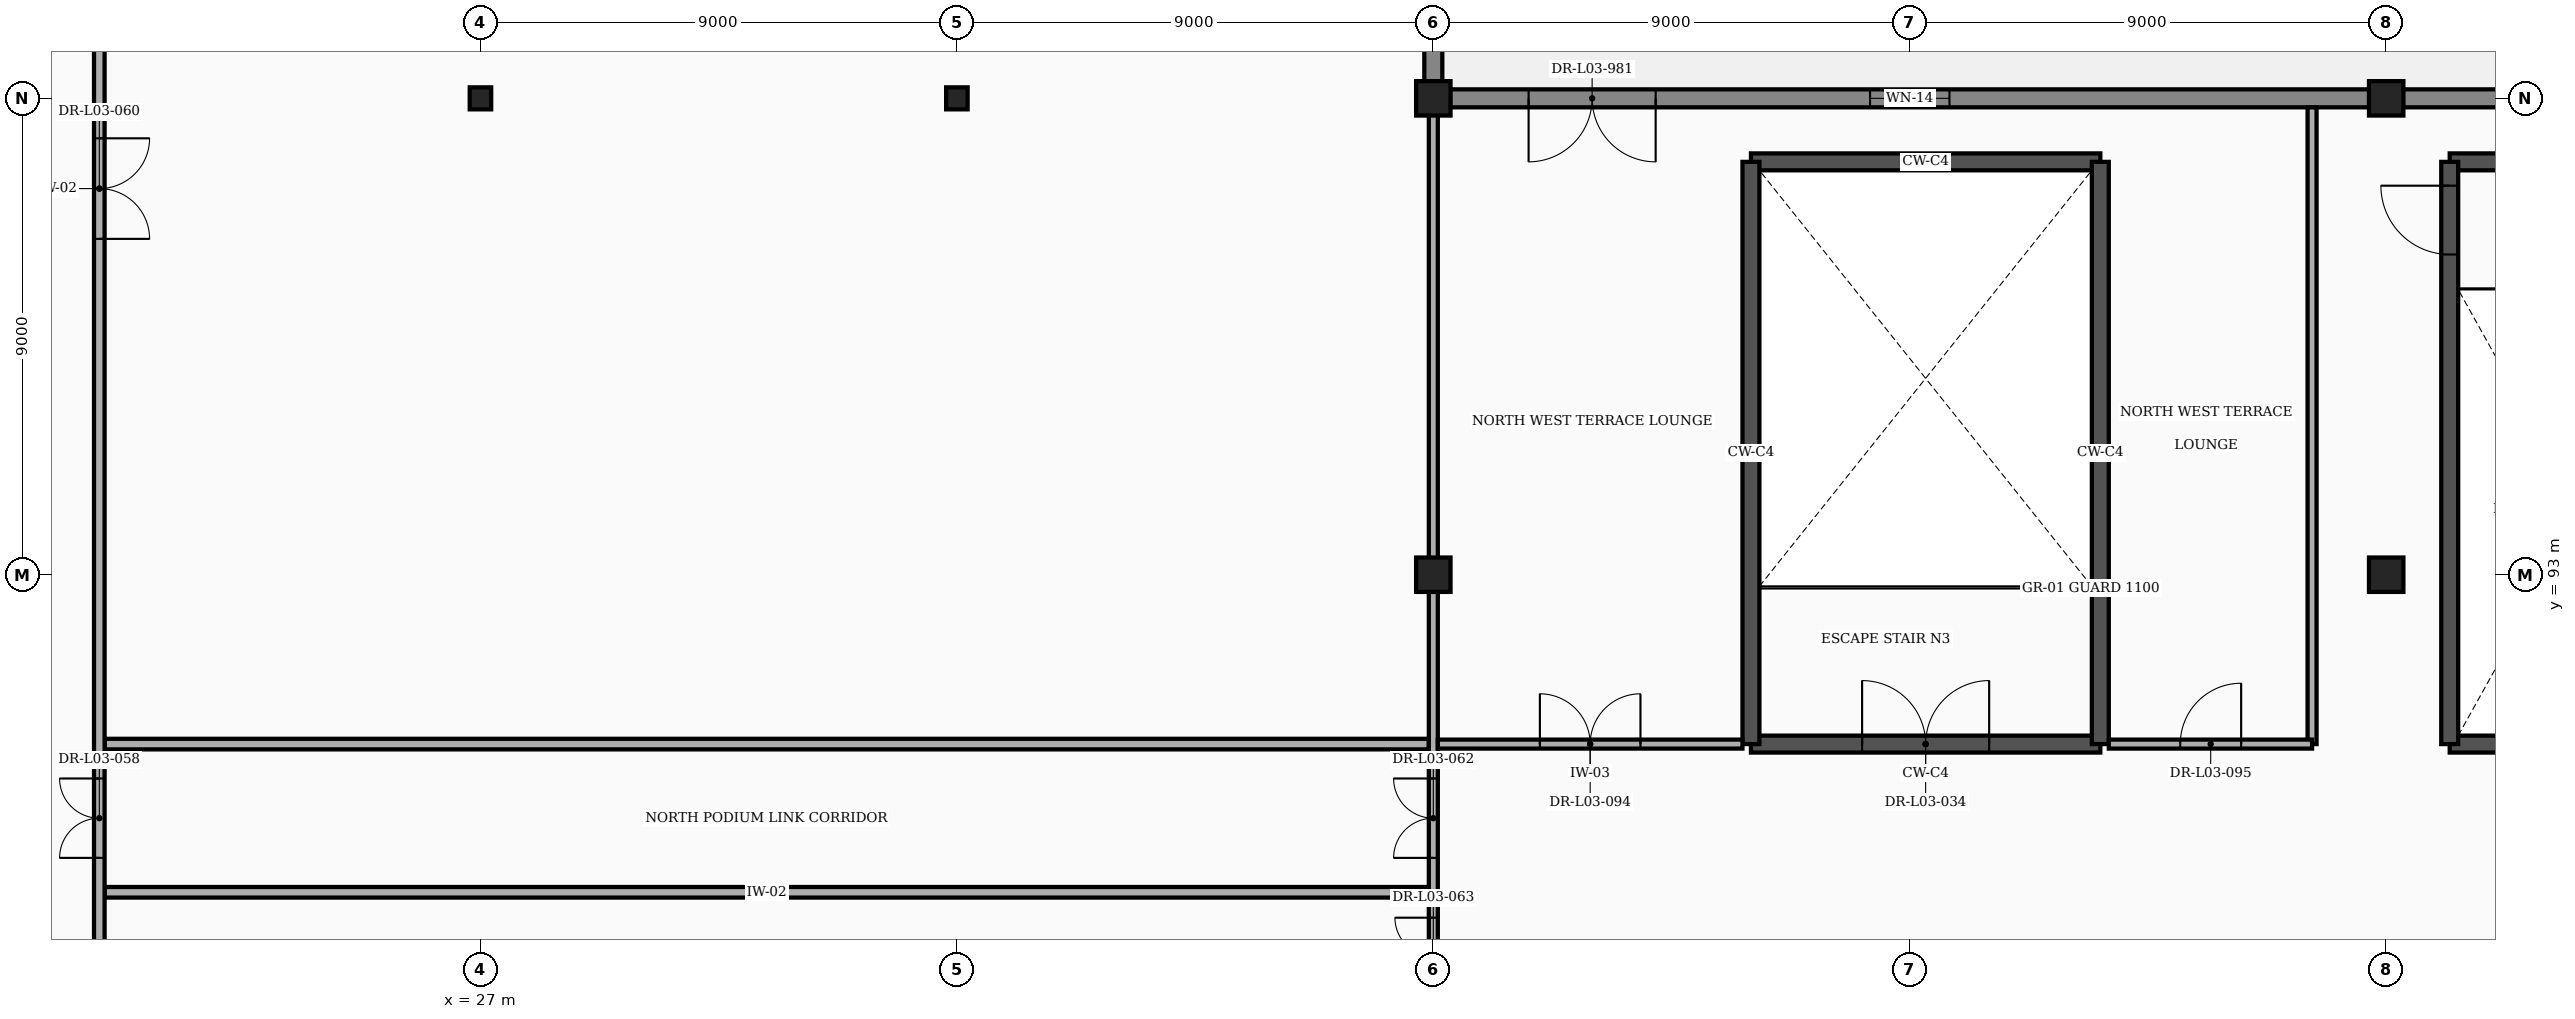
"""IFC4 building model, lengths in metres.
Left out: names, types, materials, properties, quantities, classifications, styles, units other than length and angle.
Written with IfcOpenShell. Run it as: python <this file> out.ifc"""

import sys

from ifc_helpers import new_model, si_unit, direction, frame, frame_2d, origin, origin_2d, place, context, subcontext, project, spatial, rectangle, i_section, extrude, element, fill, save


model = new_model("IFC4")
c1 = context("Model", 3, precision=1e-05, world=origin(), true_north=direction((0.0, 1.0)))
c2 = subcontext(c1, "Body", "Model", "MODEL_VIEW")
j1 = project(units=[si_unit("LENGTHUNIT", "METRE"), si_unit("PLANEANGLEUNIT", "RADIAN")], contexts=[c1])
p1 = place(None, origin())
s1 = spatial("IfcSite", under=j1, at=p1, CompositionType="ELEMENT")
p2 = place(p1, origin())
s2 = spatial("IfcBuilding", under=s1, at=p2, CompositionType="ELEMENT")
p3 = place(p2, frame((0.0, 0.0, 16.8)))
s3 = spatial("IfcBuildingStorey", under=s2, at=p3, CompositionType="ELEMENT", Elevation=16.8)
for number, where, z_axis, x_axis in (
    (1, (27.0, 102.0, 0.0), (0.0, 0.0, 1.0), (1.0, 0.0, 0.0)),
    (2, (36.0, 102.0, 0.0), (0.0, 0.0, 1.0), (1.0, 0.0, 0.0)),
):
    element("IfcColumn", number, at=place(p3, frame(where, z_axis=z_axis, x_axis=x_axis)), inside=s3, PredefinedType="COLUMN", context=c2, shape_type="SweptSolid", body=[
        extrude(i_section(OverallWidth=0.406, OverallDepth=0.416, WebThickness=0.03, FlangeThickness=0.048, at=origin_2d()), origin(), (0.0, 0.0, 1.0), 4.8),
    ])
for number, where, z_axis, x_axis in (
    (3, (45.0, 93.0, 0.0), (0.0, 0.0, 1.0), (1.0, 0.0, 0.0)),
    (4, (45.0, 102.0, 0.0), (0.0, 0.0, 1.0), (1.0, 0.0, 0.0)),
    (5, (63.0, 93.0, 0.0), (0.0, 0.0, 1.0), (1.0, 0.0, 0.0)),
    (6, (63.0, 102.0, 0.0), (0.0, 0.0, 1.0), (1.0, 0.0, 0.0)),
):
    element("IfcColumn", number, at=place(p3, frame(where, z_axis=z_axis, x_axis=x_axis)), inside=s3, PredefinedType="COLUMN", context=c2, shape_type="SweptSolid", body=[
        extrude(rectangle(XDim=0.65, YDim=0.65, at=origin_2d()), origin(), (0.0, 0.0, 1.0), 4.8),
    ])
p4 = place(p3, frame((45.317, 102.0, 0.0), z_axis=(0.0, 0.0, 1.0), x_axis=(1.0, 0.0, 0.0)))
e7 = element("IfcWall", 7, at=p4, inside=s3, PredefinedType="STANDARD", context=c2, shape_type="SweptSolid", body=[
    extrude(rectangle(XDim=17.366, YDim=0.34, at=frame_2d((8.683, 0.0))), origin(), (0.0, 0.0, 1.0), 4.195),
])
p5 = place(p4, frame((7.933, 0.0, 0.85)))
e8 = element("IfcOpeningElement", 8, at=p5, cuts=e7, PredefinedType="OPENING", context=c2, shape_type="SweptSolid", body=[
    extrude(rectangle(XDim=1.5, YDim=1.8, at=frame_2d((0.75, 0.9))), frame((0.0, 0.182, 0.0), z_axis=(0.0, -1.0, 0.0), x_axis=(1.0, 0.0, 0.0)), (0.0, 0.0, 1.0), 0.364),
])
p6 = place(p4, frame((1.483, 0.0, 0.0)))
e9 = element("IfcOpeningElement", 9, at=p6, cuts=e7, PredefinedType="OPENING", context=c2, shape_type="SweptSolid", body=[
    extrude(rectangle(XDim=2.4, YDim=2.35, at=frame_2d((1.2, 1.175))), frame((0.0, 0.182, 0.0), z_axis=(0.0, -1.0, 0.0), x_axis=(1.0, 0.0, 0.0)), (0.0, 0.0, 1.0), 0.364),
])
p7 = place(p3, frame((63.317, 102.0, 0.0), z_axis=(0.0, 0.0, 1.0), x_axis=(1.0, 0.0, 0.0)))
e10 = element("IfcWall", 10, at=p7, inside=s3, PredefinedType="STANDARD", context=c2, shape_type="SweptSolid", body=[
    extrude(rectangle(XDim=17.366, YDim=0.34, at=frame_2d((8.683, 0.0))), origin(), (0.0, 0.0, 1.0), 4.195),
])
p8 = place(p7, frame((7.783, 0.0, 0.0)))
e11 = element("IfcOpeningElement", 11, at=p8, cuts=e10, PredefinedType="OPENING", context=c2, shape_type="SweptSolid", body=[
    extrude(rectangle(XDim=1.8, YDim=2.3, at=frame_2d((0.9, 1.15))), frame((0.0, 0.182, 0.0), z_axis=(0.0, -1.0, 0.0), x_axis=(1.0, 0.0, 0.0)), (0.0, 0.0, 1.0), 0.364),
])
p9 = place(p7, frame((11.433, 0.0, 0.0)))
e12 = element("IfcOpeningElement", 12, at=p9, cuts=e10, PredefinedType="OPENING", context=c2, shape_type="SweptSolid", body=[
    extrude(rectangle(XDim=4.5, YDim=2.5, at=frame_2d((2.25, 1.25))), frame((0.0, 0.182, 0.0), z_axis=(0.0, -1.0, 0.0), x_axis=(1.0, 0.0, 0.0)), (0.0, 0.0, 1.0), 0.364),
])
p10 = place(p3, frame((45.0, 102.317, 0.0), z_axis=(0.0, 0.0, 1.0), x_axis=(0.0, 1.0, 0.0)))
e13 = element("IfcWall", 13, at=p10, inside=s3, PredefinedType="STANDARD", context=c2, shape_type="SweptSolid", body=[
    extrude(rectangle(XDim=8.366, YDim=0.34, at=frame_2d((4.183, 0.0))), origin(), (0.0, 0.0, 1.0), 4.555),
])
p11 = place(p10, frame((2.883, 0.0, 0.85)))
e14 = element("IfcOpeningElement", 14, at=p11, cuts=e13, PredefinedType="OPENING", context=c2, shape_type="SweptSolid", body=[
    extrude(rectangle(XDim=2.6, YDim=2.2, at=frame_2d((1.3, 1.1))), frame((0.0, 0.182, 0.0), z_axis=(0.0, -1.0, 0.0), x_axis=(1.0, 0.0, 0.0)), (0.0, 0.0, 1.0), 0.364),
])
for number, where, z_axis, x_axis in (
    (15, (64.2, 89.8, 0.0), (0.0, 0.0, 1.0), (1.0, 0.0, 0.0)),
    (16, (64.2, 100.8, 0.0), (0.0, 0.0, 1.0), (1.0, 0.0, 0.0)),
):
    element("IfcWall", number, at=place(p3, frame(where, z_axis=z_axis, x_axis=x_axis)), inside=s3, PredefinedType="SHEAR", context=c2, shape_type="SweptSolid", body=[
        extrude(rectangle(XDim=6.6, YDim=0.32, at=frame_2d((3.3, 0.0))), origin(), (0.0, 0.0, 1.0), 4.555),
    ])
p12 = place(p3, frame((64.2, 89.8, 0.0), z_axis=(0.0, 0.0, 1.0), x_axis=(0.0, 1.0, 0.0)))
e17 = element("IfcWall", 17, at=p12, inside=s3, PredefinedType="SHEAR", context=c2, shape_type="SweptSolid", body=[
    extrude(rectangle(XDim=11.0, YDim=0.32, at=frame_2d((5.5, 0.0))), origin(), (0.0, 0.0, 1.0), 4.555),
])
p13 = place(p12, frame((9.25, 0.0, 0.0)))
e18 = element("IfcOpeningElement", 18, at=p13, cuts=e17, PredefinedType="OPENING", context=c2, shape_type="SweptSolid", body=[
    extrude(rectangle(XDim=1.3, YDim=2.2, at=frame_2d((0.65, 1.1))), frame((0.0, 0.172, 0.0), z_axis=(0.0, -1.0, 0.0), x_axis=(1.0, 0.0, 0.0)), (0.0, 0.0, 1.0), 0.344),
])
p14 = place(p3, frame((51.0, 89.8, 0.0), z_axis=(0.0, 0.0, 1.0), x_axis=(1.0, 0.0, 0.0)))
e19 = element("IfcWall", 19, at=p14, inside=s3, PredefinedType="SHEAR", context=c2, shape_type="SweptSolid", body=[
    extrude(rectangle(XDim=6.6, YDim=0.32, at=frame_2d((3.3, 0.0))), origin(), (0.0, 0.0, 1.0), 4.555),
])
p15 = place(p14, frame((2.1, 0.0, 0.0)))
e20 = element("IfcOpeningElement", 20, at=p15, cuts=e19, PredefinedType="OPENING", context=c2, shape_type="SweptSolid", body=[
    extrude(rectangle(XDim=2.4, YDim=2.25, at=frame_2d((1.2, 1.125))), frame((0.0, 0.172, 0.0), z_axis=(0.0, -1.0, 0.0), x_axis=(1.0, 0.0, 0.0)), (0.0, 0.0, 1.0), 0.344),
])
p16 = place(p3, frame((51.0, 100.8, 0.0), z_axis=(0.0, 0.0, 1.0), x_axis=(1.0, 0.0, 0.0)))
e21 = element("IfcWall", 21, at=p16, inside=s3, PredefinedType="SHEAR", context=c2, shape_type="SweptSolid", body=[
    extrude(rectangle(XDim=6.6, YDim=0.32, at=frame_2d((3.3, 0.0))), origin(), (0.0, 0.0, 1.0), 4.555),
])
for number, where, z_axis, x_axis in (
    (22, (51.0, 89.8, 0.0), (0.0, 0.0, 1.0), (0.0, 1.0, 0.0)),
    (23, (57.6, 89.8, 0.0), (0.0, 0.0, 1.0), (0.0, 1.0, 0.0)),
):
    element("IfcWall", number, at=place(p3, frame(where, z_axis=z_axis, x_axis=x_axis)), inside=s3, PredefinedType="SHEAR", context=c2, shape_type="SweptSolid", body=[
        extrude(rectangle(XDim=11.0, YDim=0.32, at=frame_2d((5.5, 0.0))), origin(), (0.0, 0.0, 1.0), 4.555),
    ])
for number, where, z_axis, x_axis in (
    (24, (19.9, 87.0, 0.0), (0.0, 0.0, 1.0), (1.0, 0.0, 0.0)),
    (25, (19.9, 89.8, 0.0), (0.0, 0.0, 1.0), (1.0, 0.0, 0.0)),
):
    element("IfcWall", number, at=place(p3, frame(where, z_axis=z_axis, x_axis=x_axis)), inside=s3, PredefinedType="PARTITIONING", context=c2, shape_type="SweptSolid", body=[
        extrude(rectangle(XDim=25.015, YDim=0.2, at=frame_2d((12.508, 0.0))), origin(), (0.0, 0.0, 1.0), 4.555),
    ])
p17 = place(p3, frame((19.8, 80.76, 0.0), z_axis=(0.0, 0.0, 1.0), x_axis=(0.0, 1.0, 0.0)))
e26 = element("IfcWall", 26, at=p17, inside=s3, PredefinedType="PARTITIONING", context=c2, shape_type="SweptSolid", body=[
    extrude(rectangle(XDim=39.07, YDim=0.2, at=frame_2d((19.535, 0.0))), origin(), (0.0, 0.0, 1.0), 4.555),
])
p18 = place(p17, frame((1.1, 0.0, 0.0)))
e27 = element("IfcOpeningElement", 27, at=p18, cuts=e26, PredefinedType="OPENING", context=c2, shape_type="SweptSolid", body=[
    extrude(rectangle(XDim=1.15, YDim=2.15, at=frame_2d((0.575, 1.075))), frame((0.0, 0.112, 0.0), z_axis=(0.0, -1.0, 0.0), x_axis=(1.0, 0.0, 0.0)), (0.0, 0.0, 1.0), 0.224),
])
p19 = place(p17, frame((6.89, 0.0, 0.0)))
e28 = element("IfcOpeningElement", 28, at=p19, cuts=e26, PredefinedType="OPENING", context=c2, shape_type="SweptSolid", body=[
    extrude(rectangle(XDim=1.5, YDim=2.2, at=frame_2d((0.75, 1.1))), frame((0.0, 0.112, 0.0), z_axis=(0.0, -1.0, 0.0), x_axis=(1.0, 0.0, 0.0)), (0.0, 0.0, 1.0), 0.224),
])
p20 = place(p17, frame((23.19, 0.0, 0.0)))
e29 = element("IfcOpeningElement", 29, at=p20, cuts=e26, PredefinedType="OPENING", context=c2, shape_type="SweptSolid", body=[
    extrude(rectangle(XDim=1.9, YDim=2.35, at=frame_2d((0.95, 1.175))), frame((0.0, 0.112, 0.0), z_axis=(0.0, -1.0, 0.0), x_axis=(1.0, 0.0, 0.0)), (0.0, 0.0, 1.0), 0.224),
])
p21 = place(p17, frame((18.585, 0.0, 0.0)))
e30 = element("IfcOpeningElement", 30, at=p21, cuts=e26, PredefinedType="OPENING", context=c2, shape_type="SweptSolid", body=[
    extrude(rectangle(XDim=1.9, YDim=2.35, at=frame_2d((0.95, 1.175))), frame((0.0, 0.112, 0.0), z_axis=(0.0, -1.0, 0.0), x_axis=(1.0, 0.0, 0.0)), (0.0, 0.0, 1.0), 0.224),
])
p22 = place(p3, frame((45.0, 84.22, 0.0), z_axis=(0.0, 0.0, 1.0), x_axis=(0.0, 1.0, 0.0)))
e31 = element("IfcWall", 31, at=p22, inside=s3, PredefinedType="PARTITIONING", context=c2, shape_type="SweptSolid", body=[
    extrude(rectangle(XDim=8.56, YDim=0.17, at=frame_2d((4.28, 0.0))), origin(), (0.0, 0.0, 1.0), 4.258),
])
p23 = place(p22, frame((3.43, 0.0, 0.0)))
e32 = element("IfcOpeningElement", 32, at=p23, cuts=e31, PredefinedType="OPENING", context=c2, shape_type="SweptSolid", body=[
    extrude(rectangle(XDim=1.5, YDim=2.2, at=frame_2d((0.75, 1.1))), frame((0.0, 0.097, 0.0), z_axis=(0.0, -1.0, 0.0), x_axis=(1.0, 0.0, 0.0)), (0.0, 0.0, 1.0), 0.194),
])
p24 = place(p22, frame((0.85, 0.0, 0.0)))
e33 = element("IfcOpeningElement", 33, at=p24, cuts=e31, PredefinedType="OPENING", context=c2, shape_type="SweptSolid", body=[
    extrude(rectangle(XDim=1.45, YDim=2.2, at=frame_2d((0.725, 1.1))), frame((0.0, 0.097, 0.0), z_axis=(0.0, -1.0, 0.0), x_axis=(1.0, 0.0, 0.0)), (0.0, 0.0, 1.0), 0.194),
])
p25 = place(p3, frame((45.0, 93.22, 0.0), z_axis=(0.0, 0.0, 1.0), x_axis=(0.0, 1.0, 0.0)))
e34 = element("IfcWall", 34, at=p25, inside=s3, PredefinedType="PARTITIONING", context=c2, shape_type="SweptSolid", body=[
    extrude(rectangle(XDim=8.56, YDim=0.17, at=frame_2d((4.28, 0.0))), origin(), (0.0, 0.0, 1.0), 4.002),
])
p26 = place(p3, frame((61.6, 89.8, 0.0), z_axis=(0.0, 0.0, 1.0), x_axis=(0.0, 1.0, 0.0)))
e35 = element("IfcWall", 35, at=p26, inside=s3, PredefinedType="PARTITIONING", context=c2, shape_type="SweptSolid", body=[
    extrude(rectangle(XDim=12.03, YDim=0.17, at=frame_2d((6.015, 0.0))), origin(), (0.0, 0.0, 1.0), 4.555),
])
p27 = place(p3, frame((45.085, 89.8, 0.0), z_axis=(0.0, 0.0, 1.0), x_axis=(1.0, 0.0, 0.0)))
e36 = element("IfcWall", 36, at=p27, inside=s3, PredefinedType="PARTITIONING", context=c2, shape_type="SweptSolid", body=[
    extrude(rectangle(XDim=5.755, YDim=0.17, at=frame_2d((2.877, 0.0))), origin(), (0.0, 0.0, 1.0), 4.555),
])
p28 = place(p27, frame((1.928, 0.0, 0.0)))
e37 = element("IfcOpeningElement", 37, at=p28, cuts=e36, PredefinedType="OPENING", context=c2, shape_type="SweptSolid", body=[
    extrude(rectangle(XDim=1.9, YDim=2.35, at=frame_2d((0.95, 1.175))), frame((0.0, 0.097, 0.0), z_axis=(0.0, -1.0, 0.0), x_axis=(1.0, 0.0, 0.0)), (0.0, 0.0, 1.0), 0.194),
])
p29 = place(p3, frame((57.76, 89.8, 0.0), z_axis=(0.0, 0.0, 1.0), x_axis=(1.0, 0.0, 0.0)))
e38 = element("IfcWall", 38, at=p29, inside=s3, PredefinedType="PARTITIONING", context=c2, shape_type="SweptSolid", body=[
    extrude(rectangle(XDim=3.84, YDim=0.17, at=frame_2d((1.92, 0.0))), origin(), (0.0, 0.0, 1.0), 4.555),
])
p30 = place(p29, frame((1.35, 0.0, 0.0)))
e39 = element("IfcOpeningElement", 39, at=p30, cuts=e38, PredefinedType="OPENING", context=c2, shape_type="SweptSolid", body=[
    extrude(rectangle(XDim=1.15, YDim=2.15, at=frame_2d((0.575, 1.075))), frame((0.0, 0.097, 0.0), z_axis=(0.0, -1.0, 0.0), x_axis=(1.0, 0.0, 0.0)), (0.0, 0.0, 1.0), 0.194),
])
p31 = place(p5, origin())
e40 = element("IfcWindow", 40, at=p31, inside=s3, PartitioningType="SINGLE_PANEL", PredefinedType="WINDOW", context=c2, shape_type="SweptSolid", body=[
    extrude(rectangle(XDim=1.5, YDim=1.8, at=frame_2d((0.75, 0.9))), frame((0.0, 0.03, 0.0), z_axis=(0.0, -1.0, 0.0), x_axis=(1.0, 0.0, 0.0)), (0.0, 0.0, 1.0), 0.06),
])
fill(e8, e40)
p32 = place(p6, frame((2.4, 0.0, 0.0), z_axis=(0.0, 0.0, 1.0), x_axis=(-1.0, 0.0, 0.0)))
e41 = element("IfcDoor", 41, at=p32, inside=s3, OperationType="DOUBLE_DOOR_SINGLE_SWING", PredefinedType="DOOR", context=c2, shape_type="SweptSolid", body=[
    extrude(rectangle(XDim=2.4, YDim=2.35, at=frame_2d((1.2, 1.175))), frame((0.0, 0.025, 0.0), z_axis=(0.0, -1.0, 0.0), x_axis=(1.0, 0.0, 0.0)), (0.0, 0.0, 1.0), 0.05),
])
fill(e9, e41)
p33 = place(p13, origin())
e42 = element("IfcDoor", 42, at=p33, inside=s3, OperationType="SINGLE_SWING_RIGHT", PredefinedType="DOOR", context=c2, shape_type="SweptSolid", body=[
    extrude(rectangle(XDim=1.3, YDim=2.2, at=frame_2d((0.65, 1.1))), frame((0.0, 0.025, 0.0), z_axis=(0.0, -1.0, 0.0), x_axis=(1.0, 0.0, 0.0)), (0.0, 0.0, 1.0), 0.05),
])
fill(e18, e42)
p34 = place(p15, origin())
e43 = element("IfcDoor", 43, at=p34, inside=s3, OperationType="DOUBLE_DOOR_SINGLE_SWING", PredefinedType="DOOR", context=c2, shape_type="SweptSolid", body=[
    extrude(rectangle(XDim=2.4, YDim=2.25, at=frame_2d((1.2, 1.125))), frame((0.0, 0.025, 0.0), z_axis=(0.0, -1.0, 0.0), x_axis=(1.0, 0.0, 0.0)), (0.0, 0.0, 1.0), 0.05),
])
fill(e20, e43)
p35 = place(p19, origin())
e44 = element("IfcDoor", 44, at=p35, inside=s3, OperationType="DOUBLE_DOOR_SINGLE_SWING", PredefinedType="DOOR", context=c2, shape_type="SweptSolid", body=[
    extrude(rectangle(XDim=1.5, YDim=2.2, at=frame_2d((0.75, 1.1))), frame((0.0, 0.025, 0.0), z_axis=(0.0, -1.0, 0.0), x_axis=(1.0, 0.0, 0.0)), (0.0, 0.0, 1.0), 0.05),
])
fill(e28, e44)
p36 = place(p21, frame((1.9, 0.0, 0.0), z_axis=(0.0, 0.0, 1.0), x_axis=(-1.0, 0.0, 0.0)))
e45 = element("IfcDoor", 45, at=p36, inside=s3, OperationType="DOUBLE_DOOR_SINGLE_SWING", PredefinedType="DOOR", context=c2, shape_type="SweptSolid", body=[
    extrude(rectangle(XDim=1.9, YDim=2.35, at=frame_2d((0.95, 1.175))), frame((0.0, 0.025, 0.0), z_axis=(0.0, -1.0, 0.0), x_axis=(1.0, 0.0, 0.0)), (0.0, 0.0, 1.0), 0.05),
])
fill(e30, e45)
p37 = place(p23, origin())
e46 = element("IfcDoor", 46, at=p37, inside=s3, OperationType="DOUBLE_DOOR_SINGLE_SWING", PredefinedType="DOOR", context=c2, shape_type="SweptSolid", body=[
    extrude(rectangle(XDim=1.5, YDim=2.2, at=frame_2d((0.75, 1.1))), frame((0.0, 0.025, 0.0), z_axis=(0.0, -1.0, 0.0), x_axis=(1.0, 0.0, 0.0)), (0.0, 0.0, 1.0), 0.05),
])
fill(e32, e46)
p38 = place(p24, origin())
e47 = element("IfcDoor", 47, at=p38, inside=s3, OperationType="DOUBLE_DOOR_SINGLE_SWING", PredefinedType="DOOR", context=c2, shape_type="SweptSolid", body=[
    extrude(rectangle(XDim=1.45, YDim=2.2, at=frame_2d((0.725, 1.1))), frame((0.0, 0.025, 0.0), z_axis=(0.0, -1.0, 0.0), x_axis=(1.0, 0.0, 0.0)), (0.0, 0.0, 1.0), 0.05),
])
fill(e33, e47)
p39 = place(p28, origin())
e48 = element("IfcDoor", 48, at=p39, inside=s3, OperationType="DOUBLE_DOOR_SINGLE_SWING", PredefinedType="DOOR", context=c2, shape_type="SweptSolid", body=[
    extrude(rectangle(XDim=1.9, YDim=2.35, at=frame_2d((0.95, 1.175))), frame((0.0, 0.025, 0.0), z_axis=(0.0, -1.0, 0.0), x_axis=(1.0, 0.0, 0.0)), (0.0, 0.0, 1.0), 0.05),
])
fill(e37, e48)
p40 = place(p30, origin())
e49 = element("IfcDoor", 49, at=p40, inside=s3, OperationType="SINGLE_SWING_RIGHT", PredefinedType="DOOR", context=c2, shape_type="SweptSolid", body=[
    extrude(rectangle(XDim=1.15, YDim=2.15, at=frame_2d((0.575, 1.075))), frame((0.0, 0.025, 0.0), z_axis=(0.0, -1.0, 0.0), x_axis=(1.0, 0.0, 0.0)), (0.0, 0.0, 1.0), 0.05),
])
fill(e39, e49)
save(model, sys.argv[1])
